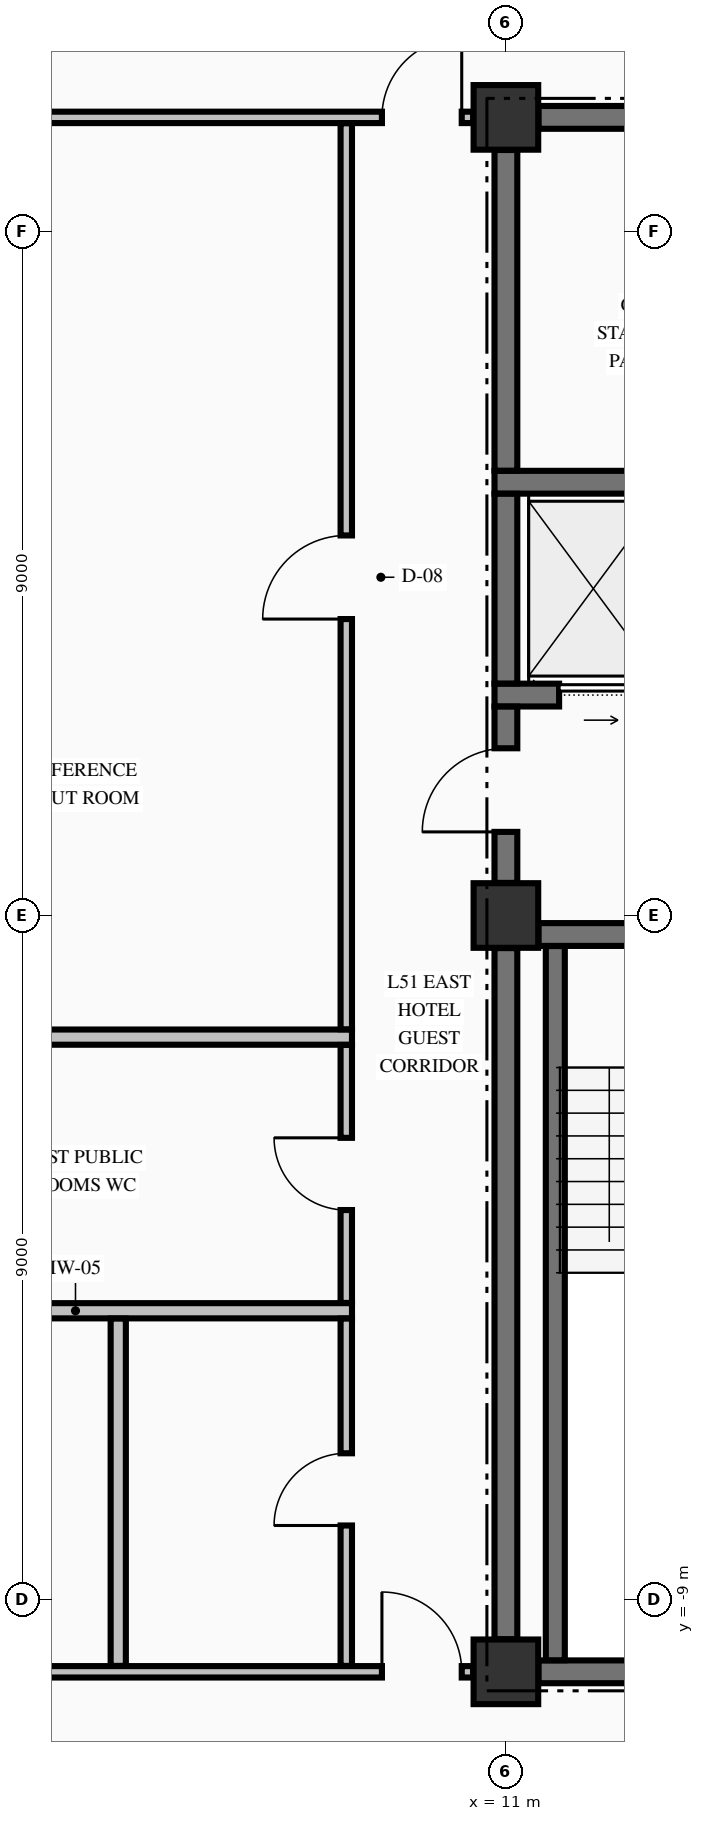
"""IFC4 building model, lengths in metres.
Left out: names, types, materials, properties, quantities, classifications, styles, units other than length and angle.
Written with IfcOpenShell. Run it as: python <this file> out.ifc"""

import sys

from ifc_helpers import new_model, si_unit, direction, frame, frame_2d, origin, origin_2d, place, context, subcontext, project, spatial, rectangle, extrude, element, fill, save


model = new_model("IFC4")
c1 = context("Model", 3, precision=1e-05, world=origin(), true_north=direction((0.0, 1.0)))
c2 = subcontext(c1, "Body", "Model", "MODEL_VIEW")
j1 = project(units=[si_unit("LENGTHUNIT", "METRE"), si_unit("PLANEANGLEUNIT", "RADIAN")], contexts=[c1])
p1 = place(None, origin())
s1 = spatial("IfcSite", under=j1, at=p1, CompositionType="ELEMENT")
p2 = place(p1, origin())
s2 = spatial("IfcBuilding", under=s1, at=p2, CompositionType="ELEMENT")
p3 = place(p2, frame((0.0, 0.0, 198.26)))
s3 = spatial("IfcBuildingStorey", under=s2, at=p3, CompositionType="ELEMENT", Elevation=198.26)
for number, where, z_axis, x_axis in (
    (1, (11.0, -9.95, -0.25), (0.0, 0.0, 1.0), (1.0, 0.0, 0.0)),
    (2, (11.0, 0.0, -0.25), (0.0, 0.0, 1.0), (1.0, 0.0, 0.0)),
    (3, (11.0, 10.5, -0.25), (0.0, 0.0, 1.0), (1.0, 0.0, 0.0)),
):
    element("IfcColumn", number, at=place(p3, frame(where, z_axis=z_axis, x_axis=x_axis)), inside=s3, PredefinedType="COLUMN", context=c2, shape_type="SweptSolid", body=[
        extrude(rectangle(XDim=0.85, YDim=0.85, at=origin_2d()), origin(), (0.0, 0.0, 1.0), 3.4),
    ])
p4 = place(p3, frame((11.429, -9.95, 0.0), z_axis=(0.0, 0.0, 1.0), x_axis=(1.0, 0.0, 0.0)))
e4 = element("IfcWall", 4, at=p4, inside=s3, PredefinedType="SHEAR", context=c2, shape_type="SweptSolid", body=[
    extrude(rectangle(XDim=3.271, YDim=0.3, at=frame_2d((1.635, 0.0))), origin(), (0.0, 0.0, 1.0), 3.15),
])
p5 = place(p3, frame((11.429, -0.25, 0.0), z_axis=(0.0, 0.0, 1.0), x_axis=(1.0, 0.0, 0.0)))
e5 = element("IfcWall", 5, at=p5, inside=s3, PredefinedType="SHEAR", context=c2, shape_type="SweptSolid", body=[
    extrude(rectangle(XDim=3.446, YDim=0.3, at=frame_2d((1.723, 0.0))), origin(), (0.0, 0.0, 1.0), 3.15),
])
p6 = place(p5, frame((1.171, 0.0, 0.0)))
e6 = element("IfcOpeningElement", 6, at=p6, cuts=e5, PredefinedType="OPENING", context=c2, shape_type="SweptSolid", body=[
    extrude(rectangle(XDim=1.1, YDim=2.15, at=frame_2d((0.55, 1.075))), frame((0.0, 0.16, 0.0), z_axis=(0.0, -1.0, 0.0), x_axis=(1.0, 0.0, 0.0)), (0.0, 0.0, 1.0), 0.32),
])
p7 = place(p3, frame((10.85, 2.9, 0.0), z_axis=(0.0, 0.0, 1.0), x_axis=(1.0, 0.0, 0.0)))
e7 = element("IfcWall", 7, at=p7, inside=s3, PredefinedType="SHEAR", context=c2, shape_type="SweptSolid", body=[
    extrude(rectangle(XDim=4.025, YDim=0.3, at=frame_2d((2.012, 0.0))), origin(), (0.0, 0.0, 1.0), 3.15),
])
p8 = place(p7, frame((0.85, 0.0, 0.0)))
e8 = element("IfcOpeningElement", 8, at=p8, cuts=e7, PredefinedType="OPENING", context=c2, shape_type="SweptSolid", body=[
    extrude(rectangle(XDim=1.1, YDim=2.2, at=frame_2d((0.55, 1.1))), frame((0.0, 0.16, 0.0), z_axis=(0.0, -1.0, 0.0), x_axis=(1.0, 0.0, 0.0)), (0.0, 0.0, 1.0), 0.32),
])
p9 = place(p3, frame((10.85, 5.7, 0.0), z_axis=(0.0, 0.0, 1.0), x_axis=(1.0, 0.0, 0.0)))
e9 = element("IfcWall", 9, at=p9, inside=s3, PredefinedType="SHEAR", context=c2, shape_type="SweptSolid", body=[
    extrude(rectangle(XDim=4.025, YDim=0.3, at=frame_2d((2.012, 0.0))), origin(), (0.0, 0.0, 1.0), 3.15),
])
p10 = place(p3, frame((11.429, 10.5, 0.0), z_axis=(0.0, 0.0, 1.0), x_axis=(1.0, 0.0, 0.0)))
e10 = element("IfcWall", 10, at=p10, inside=s3, PredefinedType="SHEAR", context=c2, shape_type="SweptSolid", body=[
    extrude(rectangle(XDim=3.271, YDim=0.3, at=frame_2d((1.635, 0.0))), origin(), (0.0, 0.0, 1.0), 3.15),
])
p11 = place(p10, frame((1.546, 0.0, 0.0)))
e11 = element("IfcOpeningElement", 11, at=p11, cuts=e10, PredefinedType="OPENING", context=c2, shape_type="SweptSolid", body=[
    extrude(rectangle(XDim=0.95, YDim=2.15, at=frame_2d((0.475, 1.075))), frame((0.0, 0.16, 0.0), z_axis=(0.0, -1.0, 0.0), x_axis=(1.0, 0.0, 0.0)), (0.0, 0.0, 1.0), 0.32),
])
p12 = place(p3, frame((-10.569, -9.95, 0.0), z_axis=(0.0, 0.0, 1.0), x_axis=(1.0, 0.0, 0.0)))
e12 = element("IfcWall", 12, at=p12, inside=s3, PredefinedType="PARTITIONING", context=c2, shape_type="SweptSolid", body=[
    extrude(rectangle(XDim=21.138, YDim=0.15, at=frame_2d((10.569, 0.0))), origin(), (0.0, 0.0, 1.0), 3.15),
])
p13 = place(p12, frame((0.15, 0.0, 0.0)))
e13 = element("IfcOpeningElement", 13, at=p13, cuts=e12, PredefinedType="OPENING", context=c2, shape_type="SweptSolid", body=[
    extrude(rectangle(XDim=1.05, YDim=2.15, at=frame_2d((0.525, 1.075))), frame((0.0, 0.085, 0.0), z_axis=(0.0, -1.0, 0.0), x_axis=(1.0, 0.0, 0.0)), (0.0, 0.0, 1.0), 0.17),
])
p14 = place(p12, frame((19.938, 0.0, 0.0)))
e14 = element("IfcOpeningElement", 14, at=p14, cuts=e12, PredefinedType="OPENING", context=c2, shape_type="SweptSolid", body=[
    extrude(rectangle(XDim=1.05, YDim=2.15, at=frame_2d((0.525, 1.075))), frame((0.0, 0.085, 0.0), z_axis=(0.0, -1.0, 0.0), x_axis=(1.0, 0.0, 0.0)), (0.0, 0.0, 1.0), 0.17),
])
p15 = place(p12, frame((13.944, 0.0, 0.0)))
e15 = element("IfcOpeningElement", 15, at=p15, cuts=e12, PredefinedType="OPENING", context=c2, shape_type="SweptSolid", body=[
    extrude(rectangle(XDim=0.95, YDim=2.15, at=frame_2d((0.475, 1.075))), frame((0.0, 0.085, 0.0), z_axis=(0.0, -1.0, 0.0), x_axis=(1.0, 0.0, 0.0)), (0.0, 0.0, 1.0), 0.17),
])
for number, where, z_axis, x_axis in (
    (16, (1.7, -5.2, 0.0), (0.0, 0.0, 1.0), (1.0, 0.0, 0.0)),
    (17, (1.7, -1.6, 0.0), (0.0, 0.0, 1.0), (1.0, 0.0, 0.0)),
):
    element("IfcWall", number, at=place(p3, frame(where, z_axis=z_axis, x_axis=x_axis)), inside=s3, PredefinedType="PARTITIONING", context=c2, shape_type="SweptSolid", body=[
        extrude(rectangle(XDim=7.275, YDim=0.2, at=frame_2d((3.638, 0.0))), origin(), (0.0, 0.0, 1.0), 3.15),
    ])
p16 = place(p3, frame((-10.569, 10.5, 0.0), z_axis=(0.0, 0.0, 1.0), x_axis=(1.0, 0.0, 0.0)))
e18 = element("IfcWall", 18, at=p16, inside=s3, PredefinedType="PARTITIONING", context=c2, shape_type="SweptSolid", body=[
    extrude(rectangle(XDim=21.138, YDim=0.15, at=frame_2d((10.569, 0.0))), origin(), (0.0, 0.0, 1.0), 3.15),
])
p17 = place(p16, frame((0.15, 0.0, 0.0)))
e19 = element("IfcOpeningElement", 19, at=p17, cuts=e18, PredefinedType="OPENING", context=c2, shape_type="SweptSolid", body=[
    extrude(rectangle(XDim=1.05, YDim=2.15, at=frame_2d((0.525, 1.075))), frame((0.0, 0.085, 0.0), z_axis=(0.0, -1.0, 0.0), x_axis=(1.0, 0.0, 0.0)), (0.0, 0.0, 1.0), 0.17),
])
p18 = place(p16, frame((19.938, 0.0, 0.0)))
e20 = element("IfcOpeningElement", 20, at=p18, cuts=e18, PredefinedType="OPENING", context=c2, shape_type="SweptSolid", body=[
    extrude(rectangle(XDim=1.05, YDim=2.15, at=frame_2d((0.525, 1.075))), frame((0.0, 0.085, 0.0), z_axis=(0.0, -1.0, 0.0), x_axis=(1.0, 0.0, 0.0)), (0.0, 0.0, 1.0), 0.17),
])
p19 = place(p3, frame((11.0, -9.521, 0.0), z_axis=(0.0, 0.0, 1.0), x_axis=(0.0, 1.0, 0.0)))
e21 = element("IfcWall", 21, at=p19, inside=s3, PredefinedType="SHEAR", context=c2, shape_type="SweptSolid", body=[
    extrude(rectangle(XDim=9.092, YDim=0.3, at=frame_2d((4.546, 0.0))), origin(), (0.0, 0.0, 1.0), 3.15),
])
p20 = place(p3, frame((11.0, 0.429, 0.0), z_axis=(0.0, 0.0, 1.0), x_axis=(0.0, 1.0, 0.0)))
e22 = element("IfcWall", 22, at=p20, inside=s3, PredefinedType="SHEAR", context=c2, shape_type="SweptSolid", body=[
    extrude(rectangle(XDim=2.319, YDim=0.3, at=frame_2d((1.16, 0.0))), origin(), (0.0, 0.0, 1.0), 3.15),
])
p21 = place(p20, frame((0.671, 0.0, 0.0)))
e23 = element("IfcOpeningElement", 23, at=p21, cuts=e22, PredefinedType="OPENING", context=c2, shape_type="SweptSolid", body=[
    extrude(rectangle(XDim=1.1, YDim=2.15, at=frame_2d((0.55, 1.075))), frame((0.0, 0.16, 0.0), z_axis=(0.0, -1.0, 0.0), x_axis=(1.0, 0.0, 0.0)), (0.0, 0.0, 1.0), 0.32),
])
p22 = place(p3, frame((11.0, 3.052, 0.0), z_axis=(0.0, 0.0, 1.0), x_axis=(0.0, 1.0, 0.0)))
e24 = element("IfcWall", 24, at=p22, inside=s3, PredefinedType="SHEAR", context=c2, shape_type="SweptSolid", body=[
    extrude(rectangle(XDim=2.496, YDim=0.3, at=frame_2d((1.248, 0.0))), origin(), (0.0, 0.0, 1.0), 3.15),
])
p23 = place(p3, frame((11.0, 5.852, 0.0), z_axis=(0.0, 0.0, 1.0), x_axis=(0.0, 1.0, 0.0)))
e25 = element("IfcWall", 25, at=p23, inside=s3, PredefinedType="SHEAR", context=c2, shape_type="SweptSolid", body=[
    extrude(rectangle(XDim=4.219, YDim=0.3, at=frame_2d((2.109, 0.0))), origin(), (0.0, 0.0, 1.0), 3.15),
])
p24 = place(p3, frame((11.65, -9.798, 0.0), z_axis=(0.0, 0.0, 1.0), x_axis=(0.0, 1.0, 0.0)))
e26 = element("IfcWall", 26, at=p24, inside=s3, PredefinedType="SOLIDWALL", context=c2, shape_type="SweptSolid", body=[
    extrude(rectangle(XDim=9.396, YDim=0.25, at=frame_2d((4.698, 0.0))), origin(), (0.0, 0.0, 1.0), 3.15),
])
p25 = place(p3, frame((5.9, -9.872, 0.0), z_axis=(0.0, 0.0, 1.0), x_axis=(0.0, 1.0, 0.0)))
e27 = element("IfcWall", 27, at=p25, inside=s3, PredefinedType="PARTITIONING", context=c2, shape_type="SweptSolid", body=[
    extrude(rectangle(XDim=4.569, YDim=0.2, at=frame_2d((2.285, 0.0))), origin(), (0.0, 0.0, 1.0), 3.15),
])
p26 = place(p3, frame((8.9, -9.872, 0.0), z_axis=(0.0, 0.0, 1.0), x_axis=(0.0, 1.0, 0.0)))
e28 = element("IfcWall", 28, at=p26, inside=s3, PredefinedType="PARTITIONING", context=c2, shape_type="SweptSolid", body=[
    extrude(rectangle(XDim=4.569, YDim=0.15, at=frame_2d((2.285, 0.0))), origin(), (0.0, 0.0, 1.0), 3.15),
])
p27 = place(p26, frame((1.847, 0.0, 0.0)))
e29 = element("IfcOpeningElement", 29, at=p27, cuts=e28, PredefinedType="OPENING", context=c2, shape_type="SweptSolid", body=[
    extrude(rectangle(XDim=0.95, YDim=2.15, at=frame_2d((0.475, 1.075))), frame((0.0, 0.085, 0.0), z_axis=(0.0, -1.0, 0.0), x_axis=(1.0, 0.0, 0.0)), (0.0, 0.0, 1.0), 0.17),
])
p28 = place(p3, frame((8.9, -5.097, 0.0), z_axis=(0.0, 0.0, 1.0), x_axis=(0.0, 1.0, 0.0)))
e30 = element("IfcWall", 30, at=p28, inside=s3, PredefinedType="PARTITIONING", context=c2, shape_type="SweptSolid", body=[
    extrude(rectangle(XDim=3.394, YDim=0.15, at=frame_2d((1.697, 0.0))), origin(), (0.0, 0.0, 1.0), 3.15),
])
p29 = place(p28, frame((1.222, 0.0, 0.0)))
e31 = element("IfcOpeningElement", 31, at=p29, cuts=e30, PredefinedType="OPENING", context=c2, shape_type="SweptSolid", body=[
    extrude(rectangle(XDim=0.95, YDim=2.15, at=frame_2d((0.475, 1.075))), frame((0.0, 0.085, 0.0), z_axis=(0.0, -1.0, 0.0), x_axis=(1.0, 0.0, 0.0)), (0.0, 0.0, 1.0), 0.17),
])
p30 = place(p3, frame((8.9, -1.497, 0.0), z_axis=(0.0, 0.0, 1.0), x_axis=(0.0, 1.0, 0.0)))
e32 = element("IfcWall", 32, at=p30, inside=s3, PredefinedType="PARTITIONING", context=c2, shape_type="SweptSolid", body=[
    extrude(rectangle(XDim=11.919, YDim=0.15, at=frame_2d((5.959, 0.0))), origin(), (0.0, 0.0, 1.0), 3.15),
])
p31 = place(p30, frame((5.397, 0.0, 0.0)))
e33 = element("IfcOpeningElement", 33, at=p31, cuts=e32, PredefinedType="OPENING", context=c2, shape_type="SweptSolid", body=[
    extrude(rectangle(XDim=1.1, YDim=2.15, at=frame_2d((0.55, 1.075))), frame((0.0, 0.085, 0.0), z_axis=(0.0, -1.0, 0.0), x_axis=(1.0, 0.0, 0.0)), (0.0, 0.0, 1.0), 0.17),
])
p32 = place(p21, origin())
e34 = element("IfcDoor", 34, at=p32, inside=s3, OperationType="SINGLE_SWING_LEFT", PredefinedType="DOOR", context=c2, shape_type="SweptSolid", body=[
    extrude(rectangle(XDim=1.1, YDim=2.15, at=frame_2d((0.55, 1.075))), frame((0.0, 0.025, 0.0), z_axis=(0.0, -1.0, 0.0), x_axis=(1.0, 0.0, 0.0)), (0.0, 0.0, 1.0), 0.05),
])
fill(e23, e34)
p33 = place(p8, origin())
e35 = element("IfcDoor", 35, at=p33, inside=s3, OperationType="SLIDING_TO_RIGHT", PredefinedType="DOOR", context=c2, shape_type="SweptSolid", body=[
    extrude(rectangle(XDim=1.1, YDim=2.2, at=frame_2d((0.55, 1.1))), frame((0.0, 0.025, 0.0), z_axis=(0.0, -1.0, 0.0), x_axis=(1.0, 0.0, 0.0)), (0.0, 0.0, 1.0), 0.05),
])
fill(e8, e35)
p34 = place(p18, origin())
e36 = element("IfcDoor", 36, at=p34, inside=s3, OperationType="SINGLE_SWING_RIGHT", PredefinedType="DOOR", context=c2, shape_type="SweptSolid", body=[
    extrude(rectangle(XDim=1.05, YDim=2.15, at=frame_2d((0.525, 1.075))), frame((0.0, 0.025, 0.0), z_axis=(0.0, -1.0, 0.0), x_axis=(1.0, 0.0, 0.0)), (0.0, 0.0, 1.0), 0.05),
])
fill(e20, e36)
p35 = place(p14, origin())
e37 = element("IfcDoor", 37, at=p35, inside=s3, OperationType="SINGLE_SWING_LEFT", PredefinedType="DOOR", context=c2, shape_type="SweptSolid", body=[
    extrude(rectangle(XDim=1.05, YDim=2.15, at=frame_2d((0.525, 1.075))), frame((0.0, 0.025, 0.0), z_axis=(0.0, -1.0, 0.0), x_axis=(1.0, 0.0, 0.0)), (0.0, 0.0, 1.0), 0.05),
])
fill(e14, e37)
p36 = place(p31, origin())
e38 = element("IfcDoor", 38, at=p36, inside=s3, OperationType="SINGLE_SWING_LEFT", PredefinedType="DOOR", context=c2, shape_type="SweptSolid", body=[
    extrude(rectangle(XDim=1.1, YDim=2.15, at=frame_2d((0.55, 1.075))), frame((0.0, 0.025, 0.0), z_axis=(0.0, -1.0, 0.0), x_axis=(1.0, 0.0, 0.0)), (0.0, 0.0, 1.0), 0.05),
])
fill(e33, e38)
p37 = place(p29, origin())
e39 = element("IfcDoor", 39, at=p37, inside=s3, OperationType="SINGLE_SWING_RIGHT", PredefinedType="DOOR", context=c2, shape_type="SweptSolid", body=[
    extrude(rectangle(XDim=0.95, YDim=2.15, at=frame_2d((0.475, 1.075))), frame((0.0, 0.025, 0.0), z_axis=(0.0, -1.0, 0.0), x_axis=(1.0, 0.0, 0.0)), (0.0, 0.0, 1.0), 0.05),
])
fill(e31, e39)
p38 = place(p27, origin())
e40 = element("IfcDoor", 40, at=p38, inside=s3, OperationType="SINGLE_SWING_LEFT", PredefinedType="DOOR", context=c2, shape_type="SweptSolid", body=[
    extrude(rectangle(XDim=0.95, YDim=2.15, at=frame_2d((0.475, 1.075))), frame((0.0, 0.025, 0.0), z_axis=(0.0, -1.0, 0.0), x_axis=(1.0, 0.0, 0.0)), (0.0, 0.0, 1.0), 0.05),
])
fill(e29, e40)
save(model, sys.argv[1])
